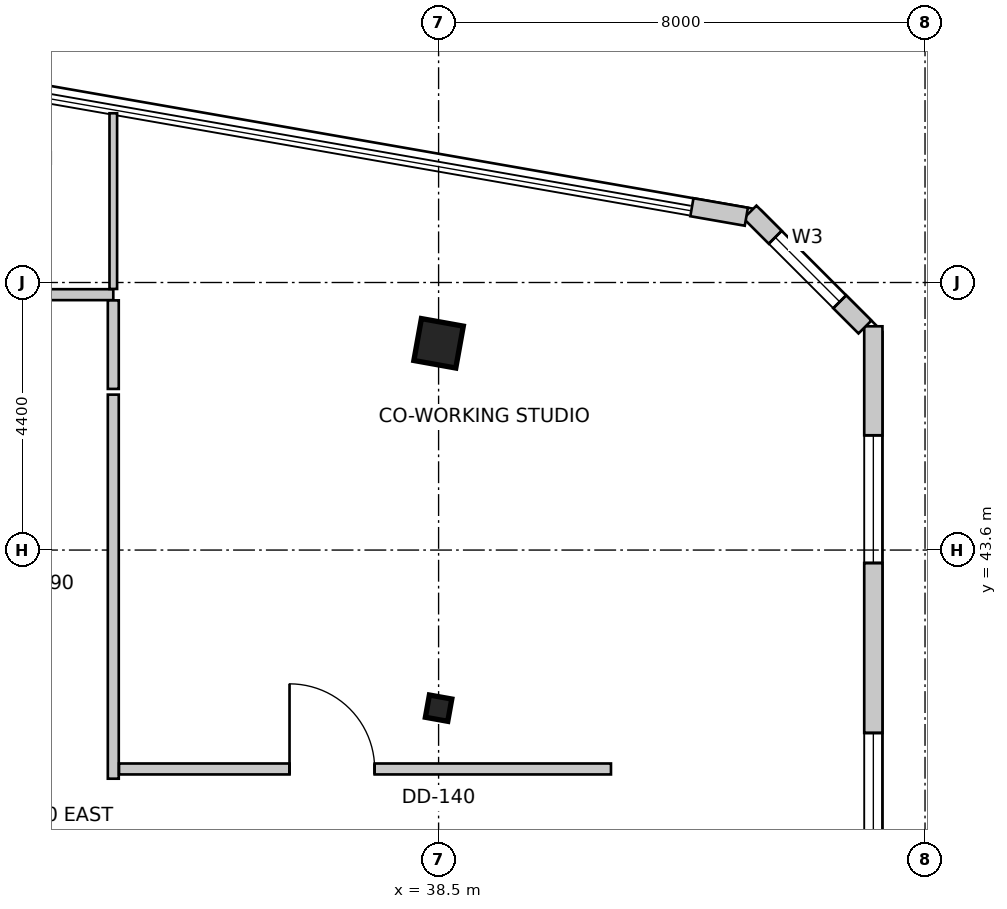
"""IFC4 building model, lengths in metres.
Left out: names, types, materials, properties, quantities, classifications, styles, units other than length and angle.
Written with IfcOpenShell. Run it as: python <this file> out.ifc"""

import sys

from ifc_helpers import new_model, si_unit, direction, frame, frame_2d, origin, origin_2d, place, context, subcontext, project, spatial, rectangle, i_section, extrude, source, transform, mapped, element, fill, save


model = new_model("IFC4")
c1 = context("Model", 3, precision=1e-05, world=origin(), true_north=direction((0.0, 1.0)))
c2 = subcontext(c1, "Body", "Model", "MODEL_VIEW")
j1 = project(units=[si_unit("LENGTHUNIT", "METRE"), si_unit("PLANEANGLEUNIT", "RADIAN")], contexts=[c1])
p1 = place(None, origin())
s1 = spatial("IfcSite", under=j1, at=p1, CompositionType="ELEMENT")
p2 = place(p1, origin())
s2 = spatial("IfcBuilding", under=s1, at=p2, CompositionType="ELEMENT")
p3 = place(p2, frame((0.0, 0.0, 235.9)))
s3 = spatial("IfcBuildingStorey", under=s2, at=p3, CompositionType="ELEMENT", Elevation=235.9)
m1 = source(origin(), c2, "Body", "SweptSolid", [
    extrude(rectangle(XDim=0.7, YDim=0.7, at=origin_2d()), origin(), (0.0, 0.0, 1.0), 3.5),
])
p4 = place(p3, frame((38.5, 47.0, 0.0), z_axis=(0.0, 0.0, 1.0), x_axis=(0.984195607969, -0.17708474032, 0.0)))
e1 = element("IfcColumn", 1, at=p4, inside=s3, PredefinedType="COLUMN", context=c2, shape_type="MappedRepresentation", body=[
    mapped(m1, transform((0.0, 0.0, 0.0), scale=1.0)),
])
m2 = source(origin(), c2, "Body", "SweptSolid", [
    extrude(i_section(OverallWidth=0.374, OverallDepth=0.372, WebThickness=0.016, FlangeThickness=0.026, FilletRadius=0.015, at=origin_2d()), origin(), (0.0, 0.0, 1.0), 3.5),
])
p5 = place(p3, frame((38.5, 41.0, 0.0), z_axis=(0.0, 0.0, 1.0), x_axis=(0.984195607969, -0.17708474032, 0.0)))
e2 = element("IfcColumn", 2, at=p5, inside=s3, PredefinedType="COLUMN", context=c2, shape_type="MappedRepresentation", body=[
    mapped(m2, transform((0.0, 0.0, 0.0), scale=1.0)),
])
p6 = place(p3, frame((45.65, 36.549, 0.0), z_axis=(0.0, 0.0, 1.0), x_axis=(0.0, 1.0, 0.0)))
e3 = element("IfcWall", 3, at=p6, inside=s3, PredefinedType="SOLIDWALL", context=c2, shape_type="SweptSolid", body=[
    extrude(rectangle(XDim=10.73, YDim=0.3, at=frame_2d((5.365, 0.0))), origin(), (0.0, 0.0, 1.0), 3.25),
])
m3 = source(origin(), c2, "Body", "SweptSolid", [
    extrude(rectangle(XDim=2.4, YDim=2.2, at=frame_2d((1.2, 1.1))), frame((0.0, 0.16, 0.0), z_axis=(0.0, -1.0, 0.0), x_axis=(1.0, 0.0, 0.0)), (0.0, 0.0, 1.0), 0.32),
])
p7 = place(p6, frame((1.643, 0.0, 0.85)))
e4 = element("IfcOpeningElement", 4, at=p7, cuts=e3, PredefinedType="OPENING", context=c2, shape_type="MappedRepresentation", body=[
    mapped(m3, transform((0.0, 0.0, 0.0), scale=1.0)),
])
m4 = source(origin(), c2, "Body", "SweptSolid", [
    extrude(rectangle(XDim=2.1, YDim=2.0, at=frame_2d((1.05, 1.0))), frame((0.0, 0.16, 0.0), z_axis=(0.0, -1.0, 0.0), x_axis=(1.0, 0.0, 0.0)), (0.0, 0.0, 1.0), 0.32),
])
p8 = place(p6, frame((6.838, 0.0, 0.85)))
e5 = element("IfcOpeningElement", 5, at=p8, cuts=e3, PredefinedType="OPENING", context=c2, shape_type="MappedRepresentation", body=[
    mapped(m4, transform((0.0, 0.0, 0.0), scale=1.0)),
])
p9 = place(p3, frame((45.512, 47.268, 0.0), z_axis=(0.0, 0.0, 1.0), x_axis=(-0.707106781187, 0.707106781187, 0.0)))
e6 = element("IfcWall", 6, at=p9, inside=s3, PredefinedType="SOLIDWALL", context=c2, shape_type="SweptSolid", body=[
    extrude(rectangle(XDim=2.674, YDim=0.3, at=frame_2d((1.337, 0.0))), origin(), (0.0, 0.0, 1.0), 3.25),
])
m5 = source(origin(), c2, "Body", "SweptSolid", [
    extrude(rectangle(XDim=1.5, YDim=1.8, at=frame_2d((0.75, 0.9))), frame((0.0, 0.16, 0.0), z_axis=(0.0, -1.0, 0.0), x_axis=(1.0, 0.0, 0.0)), (0.0, 0.0, 1.0), 0.32),
])
p10 = place(p9, frame((0.587, 0.0, 0.85)))
e7 = element("IfcOpeningElement", 7, at=p10, cuts=e6, PredefinedType="OPENING", context=c2, shape_type="MappedRepresentation", body=[
    mapped(m5, transform((0.0, 0.0, 0.0), scale=1.0)),
])
p11 = place(p3, frame((43.561, 49.081, 0.0), z_axis=(0.0, 0.0, 1.0), x_axis=(-0.985063518612, 0.172191359539, 0.0)))
e8 = element("IfcWall", 8, at=p11, inside=s3, PredefinedType="SOLIDWALL", context=c2, shape_type="SweptSolid", body=[
    extrude(rectangle(XDim=0.909, YDim=0.3, at=frame_2d((0.455, 0.0))), origin(), (0.0, 0.0, 1.0), 3.25),
])
p12 = place(p3, frame((28.362, 47.8, 0.0), z_axis=(0.0, 0.0, 1.0), x_axis=(1.0, 0.0, 0.0)))
e9 = element("IfcWall", 9, at=p12, inside=s3, PredefinedType="PARTITIONING", context=c2, shape_type="SweptSolid", body=[
    extrude(rectangle(XDim=4.788, YDim=0.18, at=frame_2d((2.394, 0.0))), origin(), (0.0, 0.0, 1.0), 2.688),
])
m6 = source(origin(), c2, "Body", "SweptSolid", [
    extrude(rectangle(XDim=0.85, YDim=2.15, at=frame_2d((0.425, 1.075))), frame((0.0, 0.1, 0.0), z_axis=(0.0, -1.0, 0.0), x_axis=(1.0, 0.0, 0.0)), (0.0, 0.0, 1.0), 0.2),
])
p13 = place(p12, frame((0.401, 0.0, 0.0)))
e10 = element("IfcOpeningElement", 10, at=p13, cuts=e9, PredefinedType="OPENING", context=c2, shape_type="MappedRepresentation", body=[
    mapped(m6, transform((0.0, 0.0, 0.0), scale=1.0)),
])
p14 = place(p3, frame((33.15, 47.706, 0.0), z_axis=(0.0, 0.0, 1.0), x_axis=(0.0, -1.0, 0.0)))
e11 = element("IfcWall", 11, at=p14, inside=s3, PredefinedType="PARTITIONING", context=c2, shape_type="SweptSolid", body=[
    extrude(rectangle(XDim=1.456, YDim=0.18, at=frame_2d((0.728, 0.0))), origin(), (0.0, 0.0, 1.0), 2.835),
])
p15 = place(p3, frame((33.15, 46.156, 0.0), z_axis=(0.0, 0.0, 1.0), x_axis=(0.0, -1.0, 0.0)))
e12 = element("IfcWall", 12, at=p15, inside=s3, PredefinedType="PARTITIONING", context=c2, shape_type="SweptSolid", body=[
    extrude(rectangle(XDim=6.316, YDim=0.18, at=frame_2d((3.158, 0.0))), origin(), (0.0, 0.0, 1.0), 2.688),
])
p16 = place(p3, frame((33.15, 50.783, 0.0), z_axis=(0.0, 0.0, 1.0), x_axis=(0.0, -1.0, 0.0)))
e13 = element("IfcWall", 13, at=p16, inside=s3, PredefinedType="PARTITIONING", context=c2, shape_type="SweptSolid", body=[
    extrude(rectangle(XDim=2.889, YDim=0.125, at=frame_2d((1.445, 0.0))), origin(), (0.0, 0.0, 1.0), 2.542),
])
p17 = place(p3, frame((33.244, 40.0, 0.0), z_axis=(0.0, 0.0, 1.0), x_axis=(1.0, 0.0, 0.0)))
e14 = element("IfcWall", 14, at=p17, inside=s3, PredefinedType="PARTITIONING", context=c2, shape_type="SweptSolid", body=[
    extrude(rectangle(XDim=8.091, YDim=0.18, at=frame_2d((4.045, 0.0))), origin(), (0.0, 0.0, 1.0), 2.766),
])
m7 = source(origin(), c2, "Body", "SweptSolid", [
    extrude(rectangle(XDim=1.4, YDim=2.15, at=frame_2d((0.7, 1.075))), frame((0.0, 0.1, 0.0), z_axis=(0.0, -1.0, 0.0), x_axis=(1.0, 0.0, 0.0)), (0.0, 0.0, 1.0), 0.2),
])
p18 = place(p17, frame((2.804, 0.0, 0.0)))
e15 = element("IfcOpeningElement", 15, at=p18, cuts=e14, PredefinedType="OPENING", context=c2, shape_type="MappedRepresentation", body=[
    mapped(m7, transform((0.0, 0.0, 0.0), scale=1.0)),
])
m8 = source(origin(), c2, "Body", "SweptSolid", [
    extrude(rectangle(XDim=2.4, YDim=2.2, at=frame_2d((1.2, 1.1))), frame((0.0, -0.015, 0.0), z_axis=(0.0, -1.0, 0.0), x_axis=(1.0, 0.0, 0.0)), (0.0, 0.0, 1.0), 0.06),
])
p19 = place(p7, origin())
e16 = element("IfcWindow", 16, at=p19, inside=s3, PartitioningType="SINGLE_PANEL", PredefinedType="WINDOW", context=c2, shape_type="MappedRepresentation", body=[
    mapped(m8, transform((0.0, 0.0, 0.0), scale=1.0)),
])
fill(e4, e16)
m9 = source(origin(), c2, "Body", "SweptSolid", [
    extrude(rectangle(XDim=2.1, YDim=2.0, at=frame_2d((1.05, 1.0))), frame((0.0, -0.015, 0.0), z_axis=(0.0, -1.0, 0.0), x_axis=(1.0, 0.0, 0.0)), (0.0, 0.0, 1.0), 0.06),
])
p20 = place(p8, origin())
e17 = element("IfcWindow", 17, at=p20, inside=s3, PartitioningType="SINGLE_PANEL", PredefinedType="WINDOW", context=c2, shape_type="MappedRepresentation", body=[
    mapped(m9, transform((0.0, 0.0, 0.0), scale=1.0)),
])
fill(e5, e17)
m10 = source(origin(), c2, "Body", "SweptSolid", [
    extrude(rectangle(XDim=1.5, YDim=1.8, at=frame_2d((0.75, 0.9))), frame((0.0, -0.015, 0.0), z_axis=(0.0, -1.0, 0.0), x_axis=(1.0, 0.0, 0.0)), (0.0, 0.0, 1.0), 0.06),
])
p21 = place(p10, origin())
e18 = element("IfcWindow", 18, at=p21, inside=s3, PartitioningType="SINGLE_PANEL", PredefinedType="WINDOW", context=c2, shape_type="MappedRepresentation", body=[
    mapped(m10, transform((0.0, 0.0, 0.0), scale=1.0)),
])
fill(e7, e18)
m11 = source(origin(), c2, "Body", "SweptSolid", [
    extrude(rectangle(XDim=1.4, YDim=2.15, at=frame_2d((0.7, 1.075))), frame((0.0, 0.025, 0.0), z_axis=(0.0, -1.0, 0.0), x_axis=(1.0, 0.0, 0.0)), (0.0, 0.0, 1.0), 0.05),
])
p22 = place(p18, origin())
e19 = element("IfcDoor", 19, at=p22, inside=s3, OperationType="SINGLE_SWING_LEFT", PredefinedType="DOOR", context=c2, shape_type="MappedRepresentation", body=[
    mapped(m11, transform((0.0, 0.0, 0.0), scale=1.0)),
])
fill(e15, e19)
save(model, sys.argv[1])
